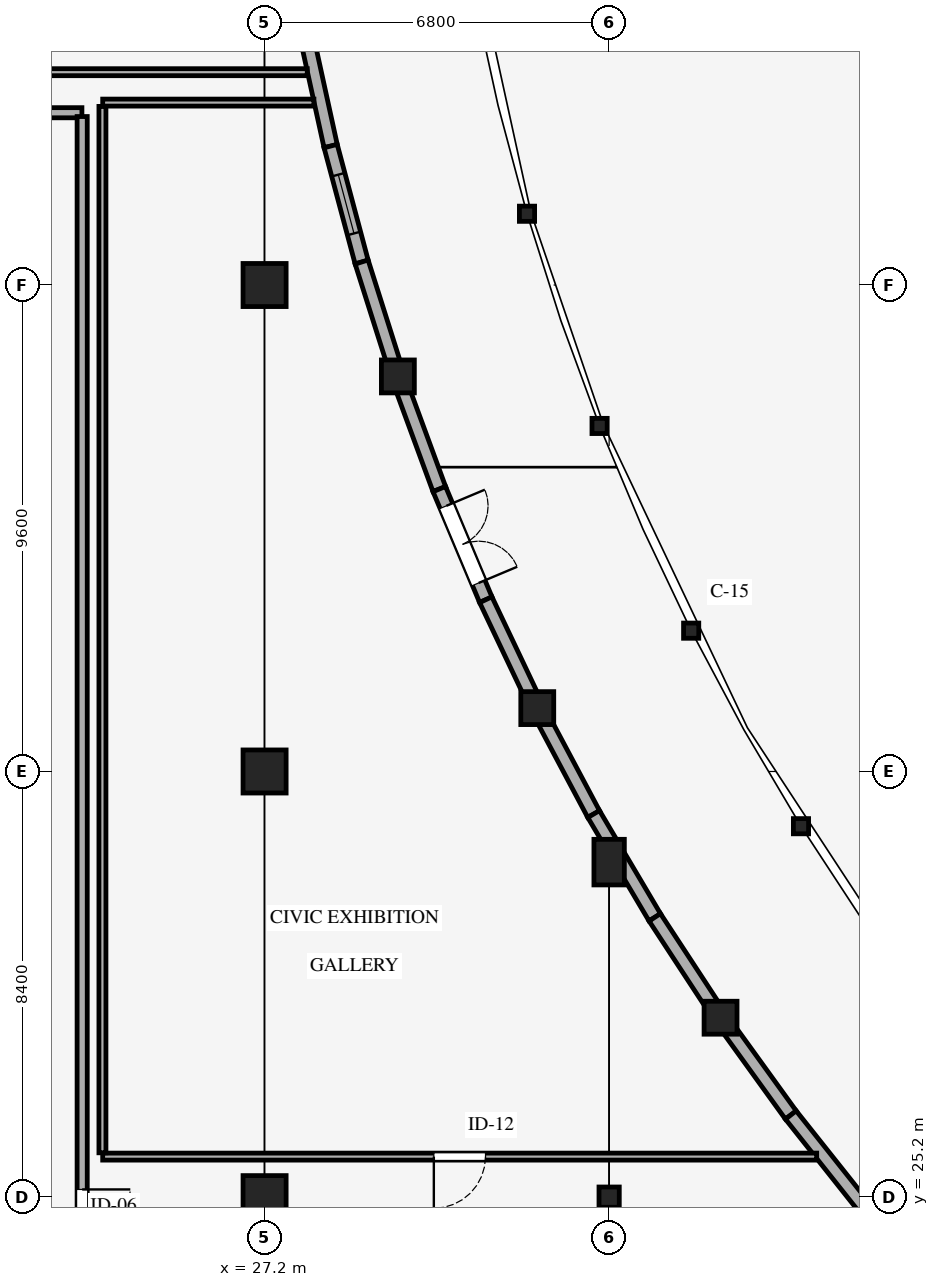
"""IFC4 building model, lengths in metres.
Left out: names, types, materials, properties, quantities, classifications, styles, units other than length and angle.
Written with IfcOpenShell. Run it as: python <this file> out.ifc"""

import sys

from ifc_helpers import new_model, si_unit, direction, frame, frame_2d, origin, origin_2d, place, context, subcontext, project, spatial, rectangle, hollow_rectangle, circle, i_section, extrude, element, fill, save


model = new_model("IFC4")
c1 = context("Model", 3, precision=1e-05, world=origin(), true_north=direction((0.0, 1.0)))
c2 = subcontext(c1, "Body", "Model", "MODEL_VIEW")
j1 = project(units=[si_unit("LENGTHUNIT", "METRE"), si_unit("PLANEANGLEUNIT", "RADIAN")], contexts=[c1])
p1 = place(None, origin())
s1 = spatial("IfcSite", under=j1, at=p1, CompositionType="ELEMENT")
p2 = place(p1, origin())
s2 = spatial("IfcBuilding", under=s1, at=p2, CompositionType="ELEMENT")
p3 = place(p2, origin())
s3 = spatial("IfcBuildingStorey", under=s2, at=p3, CompositionType="ELEMENT", Elevation=0.0)
for number, where, z_axis, x_axis in (
    (1, (27.2, 25.2, 0.0), (0.0, 0.0, 1.0), (1.0, 0.0, 0.0)),
    (2, (27.2, 33.6, 0.0), (0.0, 0.0, 1.0), (1.0, 0.0, 0.0)),
    (3, (27.2, 43.2, 0.0), (0.0, 0.0, 1.0), (1.0, 0.0, 0.0)),
):
    element("IfcColumn", number, at=place(p3, frame(where, z_axis=z_axis, x_axis=x_axis)), inside=s3, PredefinedType="COLUMN", context=c2, shape_type="SweptSolid", body=[
        extrude(rectangle(XDim=0.85, YDim=0.85, at=origin_2d()), origin(), (0.0, 0.0, 1.0), 4.8),
    ])
p4 = place(p3, frame((29.831, 41.396, 0.0), z_axis=(0.0, 0.0, 1.0), x_axis=(1.0, 0.0, 0.0)))
e4 = element("IfcColumn", 4, at=p4, inside=s3, PredefinedType="COLUMN", context=c2, shape_type="SweptSolid", body=[
    extrude(circle(Radius=0.325, at=origin_2d()), origin(), (0.0, 0.0, 1.0), 4.8),
])
p5 = place(p3, frame((32.379, 44.606, 0.0), z_axis=(0.0, 0.0, 1.0), x_axis=(1.0, 0.0, 0.0)))
e5 = element("IfcColumn", 5, at=p5, inside=s3, PredefinedType="COLUMN", context=c2, shape_type="SweptSolid", body=[
    extrude(hollow_rectangle(XDim=0.3, YDim=0.3, WallThickness=0.013, InnerFilletRadius=0.013, OuterFilletRadius=0.026, at=origin_2d()), origin(), (0.0, 0.0, 1.0), 4.8),
])
p6 = place(p3, frame((32.582, 34.851, 0.0), z_axis=(0.0, 0.0, 1.0), x_axis=(1.0, 0.0, 0.0)))
e6 = element("IfcColumn", 6, at=p6, inside=s3, PredefinedType="COLUMN", context=c2, shape_type="SweptSolid", body=[
    extrude(circle(Radius=0.325, at=origin_2d()), origin(), (0.0, 0.0, 1.0), 4.8),
])
p7 = place(p3, frame((33.812, 40.419, 0.0), z_axis=(0.0, 0.0, 1.0), x_axis=(1.0, 0.0, 0.0)))
e7 = element("IfcColumn", 7, at=p7, inside=s3, PredefinedType="COLUMN", context=c2, shape_type="SweptSolid", body=[
    extrude(hollow_rectangle(XDim=0.3, YDim=0.3, WallThickness=0.013, InnerFilletRadius=0.013, OuterFilletRadius=0.026, at=origin_2d()), origin(), (0.0, 0.0, 1.0), 4.8),
])
p8 = place(p3, frame((34.0, 25.2, 0.0), z_axis=(0.0, 0.0, 1.0), x_axis=(1.0, 0.0, 0.0)))
e8 = element("IfcColumn", 8, at=p8, inside=s3, PredefinedType="COLUMN", context=c2, shape_type="SweptSolid", body=[
    extrude(i_section(OverallWidth=0.4, OverallDepth=0.4, WebThickness=0.013, FlangeThickness=0.021, FilletRadius=0.022, at=origin_2d()), origin(), (0.0, 0.0, 1.0), 4.8),
])
p9 = place(p3, frame((34.0, 31.811, 0.0), z_axis=(0.0, 0.0, 1.0), x_axis=(1.0, 0.0, 0.0)))
e9 = element("IfcColumn", 9, at=p9, inside=s3, PredefinedType="COLUMN", context=c2, shape_type="SweptSolid", body=[
    extrude(rectangle(XDim=0.6, YDim=0.9, at=origin_2d()), origin(), (0.0, 0.0, 1.0), 4.8),
])
p10 = place(p3, frame((35.619, 36.379, 0.0), z_axis=(0.0, 0.0, 1.0), x_axis=(1.0, 0.0, 0.0)))
e10 = element("IfcColumn", 10, at=p10, inside=s3, PredefinedType="COLUMN", context=c2, shape_type="SweptSolid", body=[
    extrude(hollow_rectangle(XDim=0.3, YDim=0.3, WallThickness=0.013, InnerFilletRadius=0.013, OuterFilletRadius=0.026, at=origin_2d()), origin(), (0.0, 0.0, 1.0), 4.8),
])
p11 = place(p3, frame((36.199, 28.741, 0.0), z_axis=(0.0, 0.0, 1.0), x_axis=(1.0, 0.0, 0.0)))
e11 = element("IfcColumn", 11, at=p11, inside=s3, PredefinedType="COLUMN", context=c2, shape_type="SweptSolid", body=[
    extrude(circle(Radius=0.325, at=origin_2d()), origin(), (0.0, 0.0, 1.0), 4.8),
])
p12 = place(p3, frame((37.786, 32.52, 0.0), z_axis=(0.0, 0.0, 1.0), x_axis=(1.0, 0.0, 0.0)))
e12 = element("IfcColumn", 12, at=p12, inside=s3, PredefinedType="COLUMN", context=c2, shape_type="SweptSolid", body=[
    extrude(hollow_rectangle(XDim=0.3, YDim=0.3, WallThickness=0.013, InnerFilletRadius=0.013, OuterFilletRadius=0.026, at=origin_2d()), origin(), (0.0, 0.0, 1.0), 4.8),
])
p13 = place(p3, frame((27.997, 48.255, 0.0), z_axis=(0.0, 0.0, 1.0), x_axis=(0.214004297627, -0.97683271884, 0.0)))
e13 = element("IfcWall", 13, at=p13, inside=s3, PredefinedType="STANDARD", context=c2, shape_type="SweptSolid", body=[
    extrude(rectangle(XDim=2.368, YDim=0.268, at=frame_2d((1.184, 0.0))), origin(), (0.0, 0.0, 1.0), 3.82),
])
p14 = place(p3, frame((28.504, 45.942, 0.0), z_axis=(0.0, 0.0, 1.0), x_axis=(0.258316996005, -0.966060210119, 0.0)))
e14 = element("IfcWall", 14, at=p14, inside=s3, PredefinedType="STANDARD", context=c2, shape_type="SweptSolid", body=[
    extrude(rectangle(XDim=2.368, YDim=0.268, at=frame_2d((1.184, 0.0))), origin(), (0.0, 0.0, 1.0), 3.82),
])
p15 = place(p14, frame((0.584, 0.0, 0.9)))
e15 = element("IfcOpeningElement", 15, at=p15, cuts=e14, PredefinedType="OPENING", context=c2, shape_type="SweptSolid", body=[
    extrude(rectangle(XDim=1.2, YDim=1.8, at=frame_2d((0.6, 0.9))), frame((0.0, 0.144, 0.0), z_axis=(0.0, -1.0, 0.0), x_axis=(1.0, 0.0, 0.0)), (0.0, 0.0, 1.0), 0.288),
])
for number, where, z_axis, x_axis in (
    (16, (29.115, 43.654, 0.0), (0.0, 0.0, 1.0), (0.302, -0.953, 0.0)),
    (17, (29.831, 41.396, 0.0), (0.0, 0.0, 1.0), (0.345, -0.939, 0.0)),
):
    element("IfcWall", number, at=place(p3, frame(where, z_axis=z_axis, x_axis=x_axis)), inside=s3, PredefinedType="STANDARD", context=c2, shape_type="SweptSolid", body=[
        extrude(rectangle(XDim=2.368, YDim=0.268, at=frame_2d((1.184, 0.0))), origin(), (0.0, 0.0, 1.0), 3.82),
    ])
p16 = place(p3, frame((30.648, 39.173, 0.0), z_axis=(0.0, 0.0, 1.0), x_axis=(0.387526916132, -0.921858388948, 0.0)))
e18 = element("IfcWall", 18, at=p16, inside=s3, PredefinedType="STANDARD", context=c2, shape_type="SweptSolid", body=[
    extrude(rectangle(XDim=2.368, YDim=0.268, at=frame_2d((1.184, 0.0))), origin(), (0.0, 0.0, 1.0), 3.82),
])
p17 = place(p16, frame((0.359, 0.0, 0.0)))
e19 = element("IfcOpeningElement", 19, at=p17, cuts=e18, PredefinedType="OPENING", context=c2, shape_type="SweptSolid", body=[
    extrude(rectangle(XDim=1.65, YDim=2.2, at=frame_2d((0.825, 1.1))), frame((0.0, 0.144, 0.0), z_axis=(0.0, -1.0, 0.0), x_axis=(1.0, 0.0, 0.0)), (0.0, 0.0, 1.0), 0.288),
])
p18 = place(p3, frame((31.566, 36.99, 0.0), z_axis=(0.0, 0.0, 1.0), x_axis=(0.429021069844, -0.903294482231, 0.0)))
e20 = element("IfcWall", 20, at=p18, inside=s3, PredefinedType="STANDARD", context=c2, shape_type="SweptSolid", body=[
    extrude(rectangle(XDim=2.368, YDim=0.268, at=frame_2d((1.184, 0.0))), origin(), (0.0, 0.0, 1.0), 3.82),
])
p19 = place(p3, frame((32.582, 34.851, 0.0), z_axis=(0.0, 0.0, 1.0), x_axis=(0.469667680595, -0.882843287229, 0.0)))
e21 = element("IfcWall", 21, at=p19, inside=s3, PredefinedType="STANDARD", context=c2, shape_type="SweptSolid", body=[
    extrude(rectangle(XDim=2.368, YDim=0.268, at=frame_2d((1.184, 0.0))), origin(), (0.0, 0.0, 1.0), 3.82),
])
p20 = place(p3, frame((33.694, 32.76, 0.0), z_axis=(0.0, 0.0, 1.0), x_axis=(0.509423716395, -0.860515820409, 0.0)))
e22 = element("IfcWall", 22, at=p20, inside=s3, PredefinedType="STANDARD", context=c2, shape_type="SweptSolid", body=[
    extrude(rectangle(XDim=2.368, YDim=0.268, at=frame_2d((1.184, 0.0))), origin(), (0.0, 0.0, 1.0), 3.62),
])
p21 = place(p3, frame((34.901, 30.722, 0.0), z_axis=(0.0, 0.0, 1.0), x_axis=(0.54814066554, -0.83638616128, 0.0)))
e23 = element("IfcWall", 23, at=p21, inside=s3, PredefinedType="STANDARD", context=c2, shape_type="SweptSolid", body=[
    extrude(rectangle(XDim=2.368, YDim=0.268, at=frame_2d((1.184, 0.0))), origin(), (0.0, 0.0, 1.0), 3.82),
])
p22 = place(p3, frame((36.199, 28.741, 0.0), z_axis=(0.0, 0.0, 1.0), x_axis=(0.585588400882, -0.810608552109, 0.0)))
e24 = element("IfcWall", 24, at=p22, inside=s3, PredefinedType="STANDARD", context=c2, shape_type="SweptSolid", body=[
    extrude(rectangle(XDim=2.368, YDim=0.268, at=frame_2d((1.184, 0.0))), origin(), (0.0, 0.0, 1.0), 3.82),
])
p23 = place(p3, frame((37.586, 26.821, 0.0), z_axis=(0.0, 0.0, 1.0), x_axis=(0.621937925109, -0.783066547179, 0.0)))
e25 = element("IfcWall", 25, at=p23, inside=s3, PredefinedType="STANDARD", context=c2, shape_type="SweptSolid", body=[
    extrude(rectangle(XDim=2.368, YDim=0.268, at=frame_2d((1.184, 0.0))), origin(), (0.0, 0.0, 1.0), 3.82),
])
p24 = place(p3, frame((38.096, 26.0, 0.0), z_axis=(0.0, 0.0, 1.0), x_axis=(-1.0, 0.0, 0.0)))
e26 = element("IfcWall", 26, at=p24, inside=s3, PredefinedType="STANDARD", context=c2, shape_type="SweptSolid", body=[
    extrude(rectangle(XDim=14.091, YDim=0.138, at=frame_2d((7.045, 0.0))), origin(), (0.0, 0.0, 1.0), 3.62),
])
p25 = place(p24, frame((6.535, 0.0, 0.0)))
e27 = element("IfcOpeningElement", 27, at=p25, cuts=e26, PredefinedType="OPENING", context=c2, shape_type="SweptSolid", body=[
    extrude(rectangle(XDim=1.02, YDim=2.12, at=frame_2d((0.51, 1.06))), frame((0.0, 0.079, 0.0), z_axis=(0.0, -1.0, 0.0), x_axis=(1.0, 0.0, 0.0)), (0.0, 0.0, 1.0), 0.158),
])
p26 = place(p3, frame((24.0, 26.075, 0.0), z_axis=(0.0, 0.0, 1.0), x_axis=(0.0, 1.0, 0.0)))
e28 = element("IfcWall", 28, at=p26, inside=s3, PredefinedType="STANDARD", context=c2, shape_type="SweptSolid", body=[
    extrude(rectangle(XDim=20.65, YDim=0.138, at=frame_2d((10.325, 0.0))), origin(), (0.0, 0.0, 1.0), 4.49),
])
p27 = place(p3, frame((24.005, 46.8, 0.0), z_axis=(0.0, 0.0, 1.0), x_axis=(1.0, 0.0, 0.0)))
e29 = element("IfcWall", 29, at=p27, inside=s3, PredefinedType="STANDARD", context=c2, shape_type="SweptSolid", body=[
    extrude(rectangle(XDim=4.169, YDim=0.138, at=frame_2d((2.084, 0.0))), origin(), (0.0, 0.0, 1.0), 3.62),
])
p28 = place(p3, frame((28.042, 47.4, 0.0), z_axis=(0.0, 0.0, 1.0), x_axis=(-1.0, 0.0, 0.0)))
e30 = element("IfcWall", 30, at=p28, inside=s3, PredefinedType="STANDARD", context=c2, shape_type="SweptSolid", body=[
    extrude(rectangle(XDim=7.637, YDim=0.138, at=frame_2d((3.819, 0.0))), origin(), (0.0, 0.0, 1.0), 3.62),
])
p29 = place(p3, frame((10.405, 46.6, 0.0), z_axis=(0.0, 0.0, 1.0), x_axis=(1.0, 0.0, 0.0)))
e31 = element("IfcWall", 31, at=p29, inside=s3, PredefinedType="STANDARD", context=c2, shape_type="SweptSolid", body=[
    extrude(rectangle(XDim=13.19, YDim=0.2, at=frame_2d((6.595, 0.0))), origin(), (0.0, 0.0, 1.0), 4.49),
])
p30 = place(p3, frame((23.6, 46.525, 0.0), z_axis=(0.0, 0.0, 1.0), x_axis=(0.0, -1.0, 0.0)))
e32 = element("IfcWall", 32, at=p30, inside=s3, PredefinedType="STANDARD", context=c2, shape_type="SweptSolid", body=[
    extrude(rectangle(XDim=36.05, YDim=0.2, at=frame_2d((18.025, 0.0))), origin(), (0.0, 0.0, 1.0), 4.49),
])
p31 = place(p30, frame((21.173, 0.0, 0.0)))
e33 = element("IfcOpeningElement", 33, at=p31, cuts=e32, PredefinedType="OPENING", context=c2, shape_type="SweptSolid", body=[
    extrude(rectangle(XDim=1.9, YDim=2.35, at=frame_2d((0.95, 1.175))), frame((0.0, 0.11, 0.0), z_axis=(0.0, -1.0, 0.0), x_axis=(1.0, 0.0, 0.0)), (0.0, 0.0, 1.0), 0.22),
])
p32 = place(p15, origin())
e34 = element("IfcWindow", 34, at=p32, inside=s3, PartitioningType="SINGLE_PANEL", PredefinedType="WINDOW", context=c2, shape_type="SweptSolid", body=[
    extrude(rectangle(XDim=1.2, YDim=1.8, at=frame_2d((0.6, 0.9))), frame((0.0, 0.03, 0.0), z_axis=(0.0, -1.0, 0.0), x_axis=(1.0, 0.0, 0.0)), (0.0, 0.0, 1.0), 0.06),
])
fill(e15, e34)
p33 = place(p17, origin())
e35 = element("IfcDoor", 35, at=p33, inside=s3, OperationType="DOUBLE_DOOR_SINGLE_SWING", PredefinedType="DOOR", context=c2, shape_type="SweptSolid", body=[
    extrude(rectangle(XDim=1.65, YDim=2.2, at=frame_2d((0.825, 1.1))), frame((0.0, 0.025, 0.0), z_axis=(0.0, -1.0, 0.0), x_axis=(1.0, 0.0, 0.0)), (0.0, 0.0, 1.0), 0.05),
])
fill(e19, e35)
p34 = place(p25, origin())
e36 = element("IfcDoor", 36, at=p34, inside=s3, OperationType="SINGLE_SWING_RIGHT", PredefinedType="DOOR", context=c2, shape_type="SweptSolid", body=[
    extrude(rectangle(XDim=1.02, YDim=2.12, at=frame_2d((0.51, 1.06))), frame((0.0, 0.025, 0.0), z_axis=(0.0, -1.0, 0.0), x_axis=(1.0, 0.0, 0.0)), (0.0, 0.0, 1.0), 0.05),
])
fill(e27, e36)
p35 = place(p31, origin())
e37 = element("IfcDoor", 37, at=p35, inside=s3, OperationType="DOUBLE_DOOR_SINGLE_SWING", PredefinedType="DOOR", context=c2, shape_type="SweptSolid", body=[
    extrude(rectangle(XDim=1.9, YDim=2.35, at=frame_2d((0.95, 1.175))), frame((0.0, 0.025, 0.0), z_axis=(0.0, -1.0, 0.0), x_axis=(1.0, 0.0, 0.0)), (0.0, 0.0, 1.0), 0.05),
])
fill(e33, e37)
save(model, sys.argv[1])
